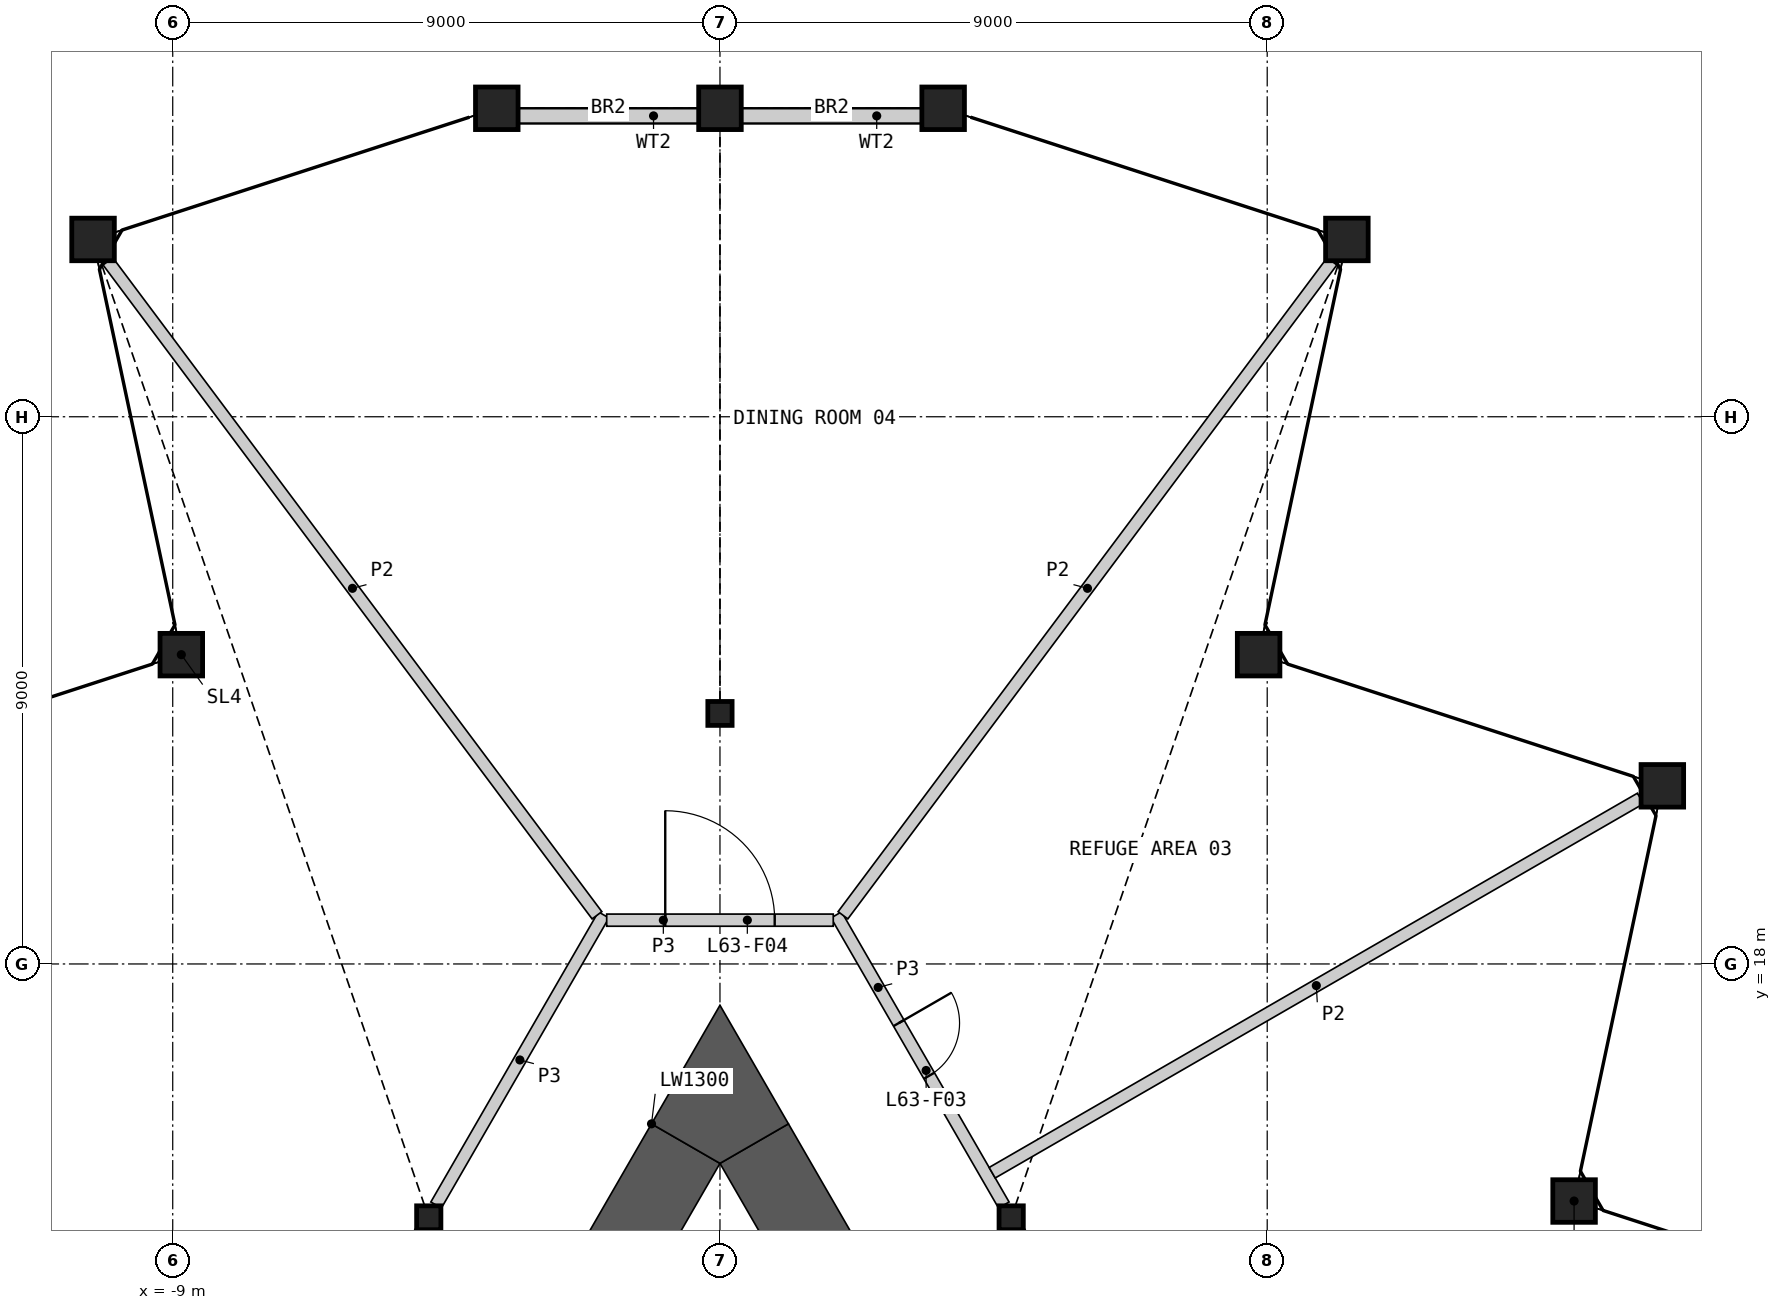
"""IFC4 building model, lengths in metres.
Left out: names, types, materials, properties, quantities, classifications, styles, units other than length and angle.
Written with IfcOpenShell. Run it as: python <this file> out.ifc"""

import sys

from ifc_helpers import new_model, si_unit, direction, frame, frame_2d, origin, origin_2d, place, context, subcontext, project, spatial, polyline, rectangle, hollow_rectangle, i_section, outline, extrude, element, fill, save


model = new_model("IFC4")
c1 = context("Model", 3, precision=1e-05, world=origin(), true_north=direction((0.0, 1.0)))
c2 = subcontext(c1, "Body", "Model", "MODEL_VIEW")
j1 = project(units=[si_unit("LENGTHUNIT", "METRE"), si_unit("PLANEANGLEUNIT", "RADIAN")], contexts=[c1])
p1 = place(None, origin())
s1 = spatial("IfcSite", under=j1, at=p1, CompositionType="ELEMENT")
p2 = place(p1, origin())
s2 = spatial("IfcBuilding", under=s1, at=p2, CompositionType="ELEMENT")
p3 = place(p2, frame((0.0, 0.0, 277.8)))
s3 = spatial("IfcBuildingStorey", under=s2, at=p3, CompositionType="ELEMENT", Elevation=277.8)
for number, where, z_axis, x_axis in (
    (1, (14.047, 14.101, 0.0), (0.0, 0.0, 1.0), (1.0, 0.0, 0.0)),
    (2, (15.499, 20.93, 0.0), (0.0, 0.0, 1.0), (1.0, 0.0, 0.0)),
    (3, (8.859, 23.087, 0.0), (0.0, 0.0, 1.0), (1.0, 0.0, 0.0)),
    (4, (10.31, 29.916, 0.0), (0.0, 0.0, 1.0), (1.0, 0.0, 0.0)),
    (5, (3.67, 32.073, 0.0), (0.0, 0.0, 1.0), (1.0, 0.0, 0.0)),
    (6, (0.0, 32.073, 0.0), (0.0, 0.0, 1.0), (1.0, 0.0, 0.0)),
    (7, (-3.67, 32.073, 0.0), (0.0, 0.0, 1.0), (1.0, 0.0, 0.0)),
    (8, (-10.31, 29.916, 0.0), (0.0, 0.0, 1.0), (1.0, 0.0, 0.0)),
    (9, (-8.859, 23.087, 0.0), (0.0, 0.0, 1.0), (1.0, 0.0, 0.0)),
):
    element("IfcColumn", number, at=place(p3, frame(where, z_axis=z_axis, x_axis=x_axis)), inside=s3, PredefinedType="COLUMN", context=c2, shape_type="SweptSolid", body=[
        extrude(hollow_rectangle(XDim=0.7, YDim=0.7, WallThickness=0.045, at=origin_2d()), origin(), (0.0, 0.0, 1.0), 10.0),
    ])
for number, where, z_axis, x_axis in (
    (10, (0.0, 22.121, 0.0), (0.0, 0.0, 1.0), (1.0, 0.0, 0.0)),
    (11, (-4.789, 13.825, 0.0), (0.0, 0.0, 1.0), (1.0, 0.0, 0.0)),
    (12, (4.789, 13.825, 0.0), (0.0, 0.0, 1.0), (1.0, 0.0, 0.0)),
):
    element("IfcColumn", number, at=place(p3, frame(where, z_axis=z_axis, x_axis=x_axis)), inside=s3, PredefinedType="COLUMN", context=c2, shape_type="SweptSolid", body=[
        extrude(i_section(OverallWidth=0.399, OverallDepth=0.393, WebThickness=0.023, FlangeThickness=0.037, at=origin_2d()), origin(), (0.0, 0.0, 1.0), 10.0),
    ])
for number, where, z_axis, x_axis in (
    (13, (3.32, 31.948, 0.0), (0.0, 0.0, 1.0), (-1.0, 0.0, 0.0)),
    (14, (-0.35, 31.948, 0.0), (0.0, 0.0, 1.0), (-1.0, 0.0, 0.0)),
):
    element("IfcWall", number, at=place(p3, frame(where, z_axis=z_axis, x_axis=x_axis)), inside=s3, PredefinedType="SOLIDWALL", context=c2, shape_type="SweptSolid", body=[
        extrude(rectangle(XDim=2.97, YDim=0.25, at=frame_2d((1.485, 0.0))), origin(), (0.0, 0.0, 1.0), 9.101),
    ])
p4 = place(p3, frame((10.081, -1.441, 0.0), z_axis=(0.0, 0.0, 1.0), x_axis=(-0.500002581376, 0.866023913421, 0.0)))
e15 = element("IfcWall", 15, at=p4, inside=s3, PredefinedType="SHEAR", context=c2, shape_type="SweptSolid", body=[
    extrude(rectangle(XDim=19.037, YDim=1.3, at=frame_2d((9.518, 0.0))), origin(), (0.0, 0.0, 1.0), 9.65),
])
p5 = place(p3, frame((-0.563, 15.045, 0.0), z_axis=(0.0, 0.0, 1.0), x_axis=(-0.50002837164, -0.866009022791, 0.0)))
e16 = element("IfcWall", 16, at=p5, inside=s3, PredefinedType="SHEAR", context=c2, shape_type="SweptSolid", body=[
    extrude(rectangle(XDim=4.26, YDim=1.3, at=frame_2d((2.13, 0.0))), origin(), (0.0, 0.0, 1.0), 9.65),
])
p6 = place(p3, origin())
e17 = element("IfcWall", 17, at=p6, inside=s3, PredefinedType="SHEAR", context=c2, shape_type="SweptSolid", body=[
    extrude(outline(polyline([(-1.126, 15.371), (0.0, 17.321), (1.126, 15.371), (0.0, 14.72), (-1.126, 15.371)])), origin(), (0.0, 0.0, 1.0), 9.65),
])
for number, where, z_axis, x_axis in (
    (18, (4.91, 13.616, 0.0), (0.0, 0.0, 1.0), (0.5, -0.866, 0.0)),
    (19, (-9.458, 5.74, 0.0), (0.0, 0.0, 1.0), (0.5, 0.866, 0.0)),
):
    element("IfcWall", number, at=place(p3, frame(where, z_axis=z_axis, x_axis=x_axis)), inside=s3, PredefinedType="PARTITIONING", context=c2, shape_type="SweptSolid", body=[
        extrude(rectangle(XDim=9.095, YDim=0.2, at=frame_2d((4.547, 0.0))), origin(), (0.0, 0.0, 1.0), 9.65),
    ])
p7 = place(p3, frame((-4.668, 14.035, 0.0), z_axis=(0.0, 0.0, 1.0), x_axis=(0.499984524817, 0.866034338201, 0.0)))
e20 = element("IfcWall", 20, at=p7, inside=s3, PredefinedType="PARTITIONING", context=c2, shape_type="SweptSolid", body=[
    extrude(rectangle(XDim=5.51, YDim=0.2, at=frame_2d((2.755, 0.0))), origin(), (0.0, 0.0, 1.0), 9.65),
])
p8 = place(p3, frame((1.913, 18.807, 0.0), z_axis=(0.0, 0.0, 1.0), x_axis=(0.499984524817, -0.866034338201, 0.0)))
e21 = element("IfcWall", 21, at=p8, inside=s3, PredefinedType="PARTITIONING", context=c2, shape_type="SweptSolid", body=[
    extrude(rectangle(XDim=5.51, YDim=0.2, at=frame_2d((2.755, 0.0))), origin(), (0.0, 0.0, 1.0), 9.65),
])
p9 = place(p8, frame((2.055, 0.0, 0.0)))
e22 = element("IfcOpeningElement", 22, at=p9, cuts=e21, PredefinedType="OPENING", context=c2, shape_type="SweptSolid", body=[
    extrude(rectangle(XDim=1.0, YDim=2.1, at=frame_2d((0.5, 1.05))), frame((0.0, 0.11, 0.0), z_axis=(0.0, -1.0, 0.0), x_axis=(1.0, 0.0, 0.0)), (0.0, 0.0, 1.0), 0.22),
])
p10 = place(p3, frame((-1.863, 18.72, 0.0), z_axis=(0.0, 0.0, 1.0), x_axis=(1.0, 0.0, 0.0)))
e23 = element("IfcWall", 23, at=p10, inside=s3, PredefinedType="PARTITIONING", context=c2, shape_type="SweptSolid", body=[
    extrude(rectangle(XDim=3.726, YDim=0.2, at=frame_2d((1.863, 0.0))), origin(), (0.0, 0.0, 1.0), 9.65),
])
p11 = place(p10, frame((0.963, 0.0, 0.0)))
e24 = element("IfcOpeningElement", 24, at=p11, cuts=e23, PredefinedType="OPENING", context=c2, shape_type="SweptSolid", body=[
    extrude(rectangle(XDim=1.8, YDim=2.1, at=frame_2d((0.9, 1.05))), frame((0.0, 0.11, 0.0), z_axis=(0.0, -1.0, 0.0), x_axis=(1.0, 0.0, 0.0)), (0.0, 0.0, 1.0), 0.22),
])
for number, where, z_axis, x_axis in (
    (25, (2.023, 18.801, 0.0), (0.0, 0.0, 1.0), (0.599, 0.801, 0.0)),
    (26, (-10.066, 29.556, 0.0), (0.0, 0.0, 1.0), (0.599, -0.801, 0.0)),
):
    element("IfcWall", number, at=place(p3, frame(where, z_axis=z_axis, x_axis=x_axis)), inside=s3, PredefinedType="PARTITIONING", context=c2, shape_type="SweptSolid", body=[
        extrude(rectangle(XDim=13.43, YDim=0.2, at=frame_2d((6.715, 0.0))), origin(), (0.0, 0.0, 1.0), 8.804),
    ])
p12 = place(p3, frame((4.477, 14.566, 0.0), z_axis=(0.0, 0.0, 1.0), x_axis=(0.866024427045, 0.500001691758, 0.0)))
e27 = element("IfcWall", 27, at=p12, inside=s3, PredefinedType="PARTITIONING", context=c2, shape_type="SweptSolid", body=[
    extrude(rectangle(XDim=12.311, YDim=0.2, at=frame_2d((6.156, 0.0))), origin(), (0.0, 0.0, 1.0), 8.804),
])
p13 = place(p9, origin())
e28 = element("IfcDoor", 28, at=p13, inside=s3, OperationType="SINGLE_SWING_LEFT", PredefinedType="DOOR", context=c2, shape_type="SweptSolid", body=[
    extrude(rectangle(XDim=1.0, YDim=2.1, at=frame_2d((0.5, 1.05))), frame((0.0, 0.025, 0.0), z_axis=(0.0, -1.0, 0.0), x_axis=(1.0, 0.0, 0.0)), (0.0, 0.0, 1.0), 0.05),
])
fill(e22, e28)
p14 = place(p11, origin())
e29 = element("IfcDoor", 29, at=p14, inside=s3, OperationType="DOUBLE_DOOR_SINGLE_SWING", PredefinedType="DOOR", context=c2, shape_type="SweptSolid", body=[
    extrude(rectangle(XDim=1.8, YDim=2.1, at=frame_2d((0.9, 1.05))), frame((0.0, 0.025, 0.0), z_axis=(0.0, -1.0, 0.0), x_axis=(1.0, 0.0, 0.0)), (0.0, 0.0, 1.0), 0.05),
])
fill(e24, e29)
save(model, sys.argv[1])
